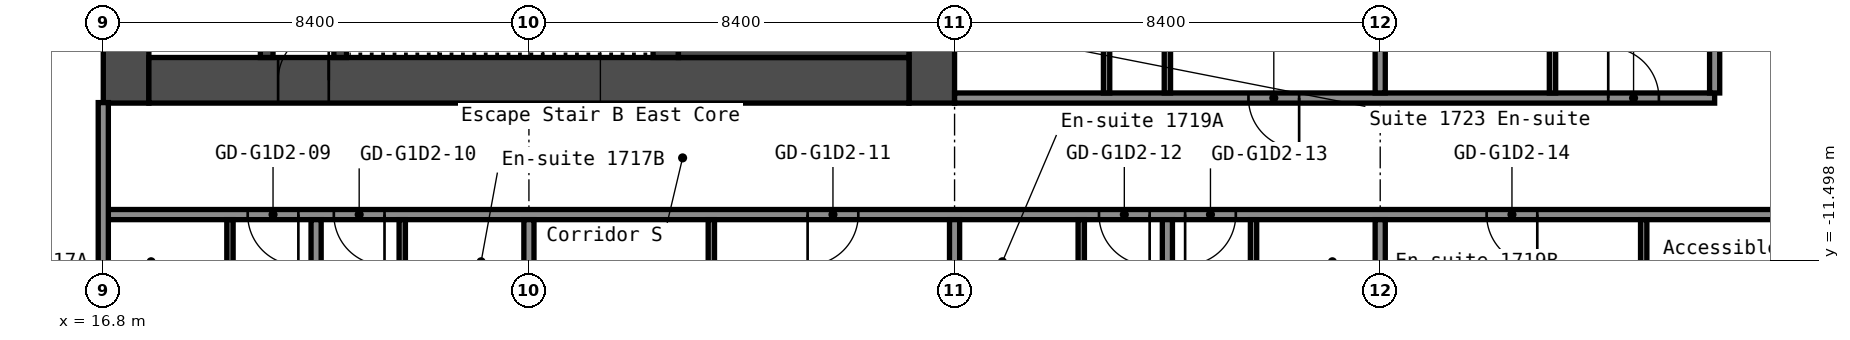
"""IFC4 building model, lengths in metres.
Left out: names, types, materials, properties, quantities, classifications, styles, units other than length and angle.
Written with IfcOpenShell. Run it as: python <this file> out.ifc"""

import sys

from ifc_helpers import new_model, si_unit, direction, frame, frame_2d, origin, place, context, subcontext, project, spatial, rectangle, extrude, element, fill, save


model = new_model("IFC4")
c1 = context("Model", 3, precision=1e-05, world=origin(), true_north=direction((0.0, 1.0)))
c2 = subcontext(c1, "Body", "Model", "MODEL_VIEW")
j1 = project(units=[si_unit("LENGTHUNIT", "METRE"), si_unit("PLANEANGLEUNIT", "RADIAN")], contexts=[c1])
p1 = place(None, origin())
s1 = spatial("IfcSite", under=j1, at=p1, CompositionType="ELEMENT")
p2 = place(p1, origin())
s2 = spatial("IfcBuilding", under=s1, at=p2, CompositionType="ELEMENT")
p3 = place(p2, frame((0.0, 0.0, 61.4)))
s3 = spatial("IfcBuildingStorey", under=s2, at=p3, CompositionType="ELEMENT", Elevation=61.4)
p4 = place(p3, frame((17.25, -8.4, 0.0), z_axis=(0.0, 0.0, 1.0), x_axis=(0.0, 1.0, 0.0)))
e1 = element("IfcWall", 1, at=p4, inside=s3, PredefinedType="SHEAR", context=c2, shape_type="SweptSolid", body=[
    extrude(rectangle(XDim=16.8, YDim=0.9, at=frame_2d((8.4, 0.0))), origin(), (0.0, 0.0, 1.0), 2.9),
])
p5 = place(p4, frame((12.75, 0.0, 0.0)))
e2 = element("IfcOpeningElement", 2, at=p5, cuts=e1, PredefinedType="OPENING", context=c2, shape_type="SweptSolid", body=[
    extrude(rectangle(XDim=1.2, YDim=2.1, at=frame_2d((0.6, 1.05))), frame((0.0, 0.46, 0.0), z_axis=(0.0, -1.0, 0.0), x_axis=(1.0, 0.0, 0.0)), (0.0, 0.0, 1.0), 0.92),
])
p6 = place(p4, frame((2.85, 0.0, 0.0)))
e3 = element("IfcOpeningElement", 3, at=p6, cuts=e1, PredefinedType="OPENING", context=c2, shape_type="SweptSolid", body=[
    extrude(rectangle(XDim=1.2, YDim=2.1, at=frame_2d((0.6, 1.05))), frame((0.0, 0.46, 0.0), z_axis=(0.0, -1.0, 0.0), x_axis=(1.0, 0.0, 0.0)), (0.0, 0.0, 1.0), 0.92),
])
p7 = place(p3, frame((33.15, -8.4, 0.0), z_axis=(0.0, 0.0, 1.0), x_axis=(0.0, 1.0, 0.0)))
e4 = element("IfcWall", 4, at=p7, inside=s3, PredefinedType="SHEAR", context=c2, shape_type="SweptSolid", body=[
    extrude(rectangle(XDim=16.8, YDim=0.9, at=frame_2d((8.4, 0.0))), origin(), (0.0, 0.0, 1.0), 2.9),
])
p8 = place(p3, frame((17.7, -7.95, 0.0), z_axis=(0.0, 0.0, 1.0), x_axis=(1.0, 0.0, 0.0)))
e5 = element("IfcWall", 5, at=p8, inside=s3, PredefinedType="SHEAR", context=c2, shape_type="SweptSolid", body=[
    extrude(rectangle(XDim=15.0, YDim=0.9, at=frame_2d((7.5, 0.0))), origin(), (0.0, 0.0, 1.0), 2.9),
])
p9 = place(p8, frame((2.55, 0.0, 0.0)))
e6 = element("IfcOpeningElement", 6, at=p9, cuts=e5, PredefinedType="OPENING", context=c2, shape_type="SweptSolid", body=[
    extrude(rectangle(XDim=1.0, YDim=2.1, at=frame_2d((0.5, 1.05))), frame((0.0, 0.46, 0.0), z_axis=(0.0, -1.0, 0.0), x_axis=(1.0, 0.0, 0.0)), (0.0, 0.0, 1.0), 0.92),
])
p10 = place(p3, frame((20.025, -7.5, 0.0), z_axis=(0.0, 0.0, 1.0), x_axis=(0.0, 1.0, 0.0)))
e7 = element("IfcWall", 7, at=p10, inside=s3, PredefinedType="SHEAR", context=c2, shape_type="SweptSolid", body=[
    extrude(rectangle(XDim=6.3, YDim=0.25, at=frame_2d((3.15, 0.0))), origin(), (0.0, 0.0, 1.0), 2.9),
])
p11 = place(p10, frame((2.4, 0.0, 0.0)))
e8 = element("IfcOpeningElement", 8, at=p11, cuts=e7, PredefinedType="OPENING", context=c2, shape_type="SweptSolid", body=[
    extrude(rectangle(XDim=1.0, YDim=2.1, at=frame_2d((0.5, 1.05))), frame((0.0, 0.135, 0.0), z_axis=(0.0, -1.0, 0.0), x_axis=(1.0, 0.0, 0.0)), (0.0, 0.0, 1.0), 0.27),
])
p12 = place(p3, frame((21.475, -7.5, 0.0), z_axis=(0.0, 0.0, 1.0), x_axis=(0.0, 1.0, 0.0)))
e9 = element("IfcWall", 9, at=p12, inside=s3, PredefinedType="SHEAR", context=c2, shape_type="SweptSolid", body=[
    extrude(rectangle(XDim=3.75, YDim=0.25, at=frame_2d((1.875, 0.0))), origin(), (0.0, 0.0, 1.0), 2.9),
])
p13 = place(p12, frame((1.3, 0.0, 0.0)))
e10 = element("IfcOpeningElement", 10, at=p13, cuts=e9, PredefinedType="OPENING", context=c2, shape_type="SweptSolid", body=[
    extrude(rectangle(XDim=1.2, YDim=2.1, at=frame_2d((0.6, 1.05))), frame((0.0, 0.135, 0.0), z_axis=(0.0, -1.0, 0.0), x_axis=(1.0, 0.0, 0.0)), (0.0, 0.0, 1.0), 0.27),
])
p14 = place(p3, frame((27.9, -7.5, 0.0), z_axis=(0.0, 0.0, 1.0), x_axis=(0.0, 1.0, 0.0)))
e11 = element("IfcWall", 11, at=p14, inside=s3, PredefinedType="SHEAR", context=c2, shape_type="SweptSolid", body=[
    extrude(rectangle(XDim=3.75, YDim=0.5, at=frame_2d((1.875, 0.0))), origin(), (0.0, 0.0, 1.0), 2.9),
])
p15 = place(p3, frame((28.15, -6.75, 0.0), z_axis=(0.0, 0.0, 1.0), x_axis=(1.0, 0.0, 0.0)))
e12 = element("IfcWall", 12, at=p15, inside=s3, PredefinedType="SHEAR", context=c2, shape_type="SweptSolid", body=[
    extrude(rectangle(XDim=4.55, YDim=1.5, at=frame_2d((2.275, 0.0))), origin(), (0.0, 0.0, 1.0), 2.9),
])
p16 = place(p3, frame((16.8, -10.6, 0.0), z_axis=(0.0, 0.0, 1.0), x_axis=(1.0, 0.0, 0.0)))
e13 = element("IfcWall", 13, at=p16, inside=s3, PredefinedType="PARTITIONING", context=c2, shape_type="SweptSolid", body=[
    extrude(rectangle(XDim=34.3, YDim=0.2, at=frame_2d((17.15, 0.0))), origin(), (0.0, 0.0, 1.0), 2.9),
])
p17 = place(p16, frame((2.85, 0.0, 0.0)))
e14 = element("IfcOpeningElement", 14, at=p17, cuts=e13, PredefinedType="OPENING", context=c2, shape_type="SweptSolid", body=[
    extrude(rectangle(XDim=1.0, YDim=2.1, at=frame_2d((0.5, 1.05))), frame((0.0, 0.11, 0.0), z_axis=(0.0, -1.0, 0.0), x_axis=(1.0, 0.0, 0.0)), (0.0, 0.0, 1.0), 0.22),
])
p18 = place(p16, frame((4.55, 0.0, 0.0)))
e15 = element("IfcOpeningElement", 15, at=p18, cuts=e13, PredefinedType="OPENING", context=c2, shape_type="SweptSolid", body=[
    extrude(rectangle(XDim=1.0, YDim=2.1, at=frame_2d((0.5, 1.05))), frame((0.0, 0.11, 0.0), z_axis=(0.0, -1.0, 0.0), x_axis=(1.0, 0.0, 0.0)), (0.0, 0.0, 1.0), 0.22),
])
p19 = place(p16, frame((13.9, 0.0, 0.0)))
e16 = element("IfcOpeningElement", 16, at=p19, cuts=e13, PredefinedType="OPENING", context=c2, shape_type="SweptSolid", body=[
    extrude(rectangle(XDim=1.0, YDim=2.1, at=frame_2d((0.5, 1.05))), frame((0.0, 0.11, 0.0), z_axis=(0.0, -1.0, 0.0), x_axis=(1.0, 0.0, 0.0)), (0.0, 0.0, 1.0), 0.22),
])
p20 = place(p16, frame((19.65, 0.0, 0.0)))
e17 = element("IfcOpeningElement", 17, at=p20, cuts=e13, PredefinedType="OPENING", context=c2, shape_type="SweptSolid", body=[
    extrude(rectangle(XDim=1.0, YDim=2.1, at=frame_2d((0.5, 1.05))), frame((0.0, 0.11, 0.0), z_axis=(0.0, -1.0, 0.0), x_axis=(1.0, 0.0, 0.0)), (0.0, 0.0, 1.0), 0.22),
])
p21 = place(p16, frame((21.35, 0.0, 0.0)))
e18 = element("IfcOpeningElement", 18, at=p21, cuts=e13, PredefinedType="OPENING", context=c2, shape_type="SweptSolid", body=[
    extrude(rectangle(XDim=1.0, YDim=2.1, at=frame_2d((0.5, 1.05))), frame((0.0, 0.11, 0.0), z_axis=(0.0, -1.0, 0.0), x_axis=(1.0, 0.0, 0.0)), (0.0, 0.0, 1.0), 0.22),
])
p22 = place(p16, frame((27.3, 0.0, 0.0)))
e19 = element("IfcOpeningElement", 19, at=p22, cuts=e13, PredefinedType="OPENING", context=c2, shape_type="SweptSolid", body=[
    extrude(rectangle(XDim=1.0, YDim=2.1, at=frame_2d((0.5, 1.05))), frame((0.0, 0.11, 0.0), z_axis=(0.0, -1.0, 0.0), x_axis=(1.0, 0.0, 0.0)), (0.0, 0.0, 1.0), 0.22),
])
p23 = place(p3, frame((33.6, -8.3, 0.0), z_axis=(0.0, 0.0, 1.0), x_axis=(1.0, 0.0, 0.0)))
e20 = element("IfcWall", 20, at=p23, inside=s3, PredefinedType="PARTITIONING", context=c2, shape_type="SweptSolid", body=[
    extrude(rectangle(XDim=15.0, YDim=0.2, at=frame_2d((7.5, 0.0))), origin(), (0.0, 0.0, 1.0), 2.9),
])
p24 = place(p23, frame((5.8, 0.0, 0.0)))
e21 = element("IfcOpeningElement", 21, at=p24, cuts=e20, PredefinedType="OPENING", context=c2, shape_type="SweptSolid", body=[
    extrude(rectangle(XDim=1.0, YDim=2.1, at=frame_2d((0.5, 1.05))), frame((0.0, 0.11, 0.0), z_axis=(0.0, -1.0, 0.0), x_axis=(1.0, 0.0, 0.0)), (0.0, 0.0, 1.0), 0.22),
])
p25 = place(p23, frame((12.9, 0.0, 0.0)))
e22 = element("IfcOpeningElement", 22, at=p25, cuts=e20, PredefinedType="OPENING", context=c2, shape_type="SweptSolid", body=[
    extrude(rectangle(XDim=1.0, YDim=2.1, at=frame_2d((0.5, 1.05))), frame((0.0, 0.11, 0.0), z_axis=(0.0, -1.0, 0.0), x_axis=(1.0, 0.0, 0.0)), (0.0, 0.0, 1.0), 0.22),
])
p26 = place(p3, frame((16.8, -20.3, 0.0), z_axis=(0.0, 0.0, 1.0), x_axis=(0.0, 1.0, 0.0)))
e23 = element("IfcWall", 23, at=p26, inside=s3, PredefinedType="PARTITIONING", context=c2, shape_type="SweptSolid", body=[
    extrude(rectangle(XDim=11.91, YDim=0.2, at=frame_2d((5.955, 0.0))), origin(), (0.0, 0.0, 1.0), 2.9),
])
p27 = place(p3, frame((19.3, -13.6, 0.0), z_axis=(0.0, 0.0, 1.0), x_axis=(0.0, 1.0, 0.0)))
e24 = element("IfcWall", 24, at=p27, inside=s3, PredefinedType="PARTITIONING", context=c2, shape_type="SweptSolid", body=[
    extrude(rectangle(XDim=2.9, YDim=0.125, at=frame_2d((1.45, 0.0))), origin(), (0.0, 0.0, 1.0), 2.9),
])
p28 = place(p27, frame((0.6, 0.0, 0.0)))
e25 = element("IfcOpeningElement", 25, at=p28, cuts=e24, PredefinedType="OPENING", context=c2, shape_type="SweptSolid", body=[
    extrude(rectangle(XDim=0.8, YDim=2.1, at=frame_2d((0.4, 1.05))), frame((0.0, 0.073, 0.0), z_axis=(0.0, -1.0, 0.0), x_axis=(1.0, 0.0, 0.0)), (0.0, 0.0, 1.0), 0.145),
])
p29 = place(p3, frame((21.0, -20.3, 0.0), z_axis=(0.0, 0.0, 1.0), x_axis=(0.0, 1.0, 0.0)))
e26 = element("IfcWall", 26, at=p29, inside=s3, PredefinedType="PARTITIONING", context=c2, shape_type="SweptSolid", body=[
    extrude(rectangle(XDim=9.6, YDim=0.2, at=frame_2d((4.8, 0.0))), origin(), (0.0, 0.0, 1.0), 2.9),
])
p30 = place(p3, frame((22.7, -13.6, 0.0), z_axis=(0.0, 0.0, 1.0), x_axis=(0.0, 1.0, 0.0)))
e27 = element("IfcWall", 27, at=p30, inside=s3, PredefinedType="PARTITIONING", context=c2, shape_type="SweptSolid", body=[
    extrude(rectangle(XDim=2.9, YDim=0.125, at=frame_2d((1.45, 0.0))), origin(), (0.0, 0.0, 1.0), 2.9),
])
p31 = place(p30, frame((0.6, 0.0, 0.0)))
e28 = element("IfcOpeningElement", 28, at=p31, cuts=e27, PredefinedType="OPENING", context=c2, shape_type="SweptSolid", body=[
    extrude(rectangle(XDim=0.8, YDim=2.1, at=frame_2d((0.4, 1.05))), frame((0.0, 0.073, 0.0), z_axis=(0.0, -1.0, 0.0), x_axis=(1.0, 0.0, 0.0)), (0.0, 0.0, 1.0), 0.145),
])
p32 = place(p3, frame((25.2, -20.3, 0.0), z_axis=(0.0, 0.0, 1.0), x_axis=(0.0, 1.0, 0.0)))
e29 = element("IfcWall", 29, at=p32, inside=s3, PredefinedType="PARTITIONING", context=c2, shape_type="SweptSolid", body=[
    extrude(rectangle(XDim=9.6, YDim=0.2, at=frame_2d((4.8, 0.0))), origin(), (0.0, 0.0, 1.0), 2.9),
])
p33 = place(p3, frame((28.8, -14.0, 0.0), z_axis=(0.0, 0.0, 1.0), x_axis=(0.0, 1.0, 0.0)))
e30 = element("IfcWall", 30, at=p33, inside=s3, PredefinedType="PARTITIONING", context=c2, shape_type="SweptSolid", body=[
    extrude(rectangle(XDim=3.3, YDim=0.125, at=frame_2d((1.65, 0.0))), origin(), (0.0, 0.0, 1.0), 2.9),
])
p34 = place(p33, frame((1.2, 0.0, 0.0)))
e31 = element("IfcOpeningElement", 31, at=p34, cuts=e30, PredefinedType="OPENING", context=c2, shape_type="SweptSolid", body=[
    extrude(rectangle(XDim=1.0, YDim=2.1, at=frame_2d((0.5, 1.05))), frame((0.0, 0.073, 0.0), z_axis=(0.0, -1.0, 0.0), x_axis=(1.0, 0.0, 0.0)), (0.0, 0.0, 1.0), 0.145),
])
p35 = place(p3, frame((33.6, -20.3, 0.0), z_axis=(0.0, 0.0, 1.0), x_axis=(0.0, 1.0, 0.0)))
e32 = element("IfcWall", 32, at=p35, inside=s3, PredefinedType="PARTITIONING", context=c2, shape_type="SweptSolid", body=[
    extrude(rectangle(XDim=9.6, YDim=0.2, at=frame_2d((4.8, 0.0))), origin(), (0.0, 0.0, 1.0), 2.9),
])
p36 = place(p3, frame((36.1, -13.6, 0.0), z_axis=(0.0, 0.0, 1.0), x_axis=(0.0, 1.0, 0.0)))
e33 = element("IfcWall", 33, at=p36, inside=s3, PredefinedType="PARTITIONING", context=c2, shape_type="SweptSolid", body=[
    extrude(rectangle(XDim=2.9, YDim=0.125, at=frame_2d((1.45, 0.0))), origin(), (0.0, 0.0, 1.0), 2.9),
])
p37 = place(p36, frame((0.6, 0.0, 0.0)))
e34 = element("IfcOpeningElement", 34, at=p37, cuts=e33, PredefinedType="OPENING", context=c2, shape_type="SweptSolid", body=[
    extrude(rectangle(XDim=0.8, YDim=2.1, at=frame_2d((0.4, 1.05))), frame((0.0, 0.073, 0.0), z_axis=(0.0, -1.0, 0.0), x_axis=(1.0, 0.0, 0.0)), (0.0, 0.0, 1.0), 0.145),
])
p38 = place(p3, frame((36.6, -8.2, 0.0), z_axis=(0.0, 0.0, 1.0), x_axis=(0.0, 1.0, 0.0)))
e35 = element("IfcWall", 35, at=p38, inside=s3, PredefinedType="PARTITIONING", context=c2, shape_type="SweptSolid", body=[
    extrude(rectangle(XDim=3.1, YDim=0.125, at=frame_2d((1.55, 0.0))), origin(), (0.0, 0.0, 1.0), 2.9),
])
p39 = place(p3, frame((37.8, -20.3, 0.0), z_axis=(0.0, 0.0, 1.0), x_axis=(0.0, 1.0, 0.0)))
e36 = element("IfcWall", 36, at=p39, inside=s3, PredefinedType="PARTITIONING", context=c2, shape_type="SweptSolid", body=[
    extrude(rectangle(XDim=9.6, YDim=0.2, at=frame_2d((4.8, 0.0))), origin(), (0.0, 0.0, 1.0), 2.9),
])
p40 = place(p3, frame((37.8, -8.2, 0.0), z_axis=(0.0, 0.0, 1.0), x_axis=(0.0, 1.0, 0.0)))
e37 = element("IfcWall", 37, at=p40, inside=s3, PredefinedType="PARTITIONING", context=c2, shape_type="SweptSolid", body=[
    extrude(rectangle(XDim=16.4, YDim=0.125, at=frame_2d((8.2, 0.0))), origin(), (0.0, 0.0, 1.0), 2.9),
])
p41 = place(p40, frame((4.05, 0.0, 0.0)))
e38 = element("IfcOpeningElement", 38, at=p41, cuts=e37, PredefinedType="OPENING", context=c2, shape_type="SweptSolid", body=[
    extrude(rectangle(XDim=0.9, YDim=2.1, at=frame_2d((0.45, 1.05))), frame((0.0, 0.073, 0.0), z_axis=(0.0, -1.0, 0.0), x_axis=(1.0, 0.0, 0.0)), (0.0, 0.0, 1.0), 0.145),
])
p42 = place(p40, frame((11.45, 0.0, 0.0)))
e39 = element("IfcOpeningElement", 39, at=p42, cuts=e37, PredefinedType="OPENING", context=c2, shape_type="SweptSolid", body=[
    extrude(rectangle(XDim=0.9, YDim=2.1, at=frame_2d((0.45, 1.05))), frame((0.0, 0.073, 0.0), z_axis=(0.0, -1.0, 0.0), x_axis=(1.0, 0.0, 0.0)), (0.0, 0.0, 1.0), 0.145),
])
p43 = place(p3, frame((39.5, -13.6, 0.0), z_axis=(0.0, 0.0, 1.0), x_axis=(0.0, 1.0, 0.0)))
e40 = element("IfcWall", 40, at=p43, inside=s3, PredefinedType="PARTITIONING", context=c2, shape_type="SweptSolid", body=[
    extrude(rectangle(XDim=2.9, YDim=0.125, at=frame_2d((1.45, 0.0))), origin(), (0.0, 0.0, 1.0), 2.9),
])
p44 = place(p43, frame((0.6, 0.0, 0.0)))
e41 = element("IfcOpeningElement", 41, at=p44, cuts=e40, PredefinedType="OPENING", context=c2, shape_type="SweptSolid", body=[
    extrude(rectangle(XDim=0.8, YDim=2.1, at=frame_2d((0.4, 1.05))), frame((0.0, 0.073, 0.0), z_axis=(0.0, -1.0, 0.0), x_axis=(1.0, 0.0, 0.0)), (0.0, 0.0, 1.0), 0.145),
])
p45 = place(p3, frame((42.0, -20.3, 0.0), z_axis=(0.0, 0.0, 1.0), x_axis=(0.0, 1.0, 0.0)))
e42 = element("IfcWall", 42, at=p45, inside=s3, PredefinedType="PARTITIONING", context=c2, shape_type="SweptSolid", body=[
    extrude(rectangle(XDim=9.6, YDim=0.2, at=frame_2d((4.8, 0.0))), origin(), (0.0, 0.0, 1.0), 2.9),
])
p46 = place(p3, frame((42.0, -8.2, 0.0), z_axis=(0.0, 0.0, 1.0), x_axis=(0.0, 1.0, 0.0)))
e43 = element("IfcWall", 43, at=p46, inside=s3, PredefinedType="PARTITIONING", context=c2, shape_type="SweptSolid", body=[
    extrude(rectangle(XDim=16.4, YDim=0.2, at=frame_2d((8.2, 0.0))), origin(), (0.0, 0.0, 1.0), 2.9),
])
p47 = place(p3, frame((45.4, -8.2, 0.0), z_axis=(0.0, 0.0, 1.0), x_axis=(0.0, 1.0, 0.0)))
e44 = element("IfcWall", 44, at=p47, inside=s3, PredefinedType="PARTITIONING", context=c2, shape_type="SweptSolid", body=[
    extrude(rectangle(XDim=3.3, YDim=0.125, at=frame_2d((1.65, 0.0))), origin(), (0.0, 0.0, 1.0), 2.9),
])
p48 = place(p3, frame((47.2, -14.0, 0.0), z_axis=(0.0, 0.0, 1.0), x_axis=(0.0, 1.0, 0.0)))
e45 = element("IfcWall", 45, at=p48, inside=s3, PredefinedType="PARTITIONING", context=c2, shape_type="SweptSolid", body=[
    extrude(rectangle(XDim=3.3, YDim=0.125, at=frame_2d((1.65, 0.0))), origin(), (0.0, 0.0, 1.0), 2.9),
])
p49 = place(p48, frame((1.2, 0.0, 0.0)))
e46 = element("IfcOpeningElement", 46, at=p49, cuts=e45, PredefinedType="OPENING", context=c2, shape_type="SweptSolid", body=[
    extrude(rectangle(XDim=1.0, YDim=2.1, at=frame_2d((0.5, 1.05))), frame((0.0, 0.073, 0.0), z_axis=(0.0, -1.0, 0.0), x_axis=(1.0, 0.0, 0.0)), (0.0, 0.0, 1.0), 0.145),
])
p50 = place(p3, frame((48.6, -8.2, 0.0), z_axis=(0.0, 0.0, 1.0), x_axis=(0.0, 1.0, 0.0)))
e47 = element("IfcWall", 47, at=p50, inside=s3, PredefinedType="PARTITIONING", context=c2, shape_type="SweptSolid", body=[
    extrude(rectangle(XDim=16.4, YDim=0.2, at=frame_2d((8.2, 0.0))), origin(), (0.0, 0.0, 1.0), 2.9),
])
p51 = place(p9, origin())
e48 = element("IfcDoor", 48, at=p51, inside=s3, OperationType="SINGLE_SWING_LEFT", PredefinedType="DOOR", context=c2, shape_type="SweptSolid", body=[
    extrude(rectangle(XDim=1.0, YDim=2.1, at=frame_2d((0.5, 1.05))), frame((0.0, 0.025, 0.0), z_axis=(0.0, -1.0, 0.0), x_axis=(1.0, 0.0, 0.0)), (0.0, 0.0, 1.0), 0.05),
])
fill(e6, e48)
p52 = place(p17, origin())
e49 = element("IfcDoor", 49, at=p52, inside=s3, OperationType="SINGLE_SWING_RIGHT", PredefinedType="DOOR", context=c2, shape_type="SweptSolid", body=[
    extrude(rectangle(XDim=1.0, YDim=2.1, at=frame_2d((0.5, 1.05))), frame((0.0, 0.025, 0.0), z_axis=(0.0, -1.0, 0.0), x_axis=(1.0, 0.0, 0.0)), (0.0, 0.0, 1.0), 0.05),
])
fill(e14, e49)
p53 = place(p18, origin())
e50 = element("IfcDoor", 50, at=p53, inside=s3, OperationType="SINGLE_SWING_RIGHT", PredefinedType="DOOR", context=c2, shape_type="SweptSolid", body=[
    extrude(rectangle(XDim=1.0, YDim=2.1, at=frame_2d((0.5, 1.05))), frame((0.0, 0.025, 0.0), z_axis=(0.0, -1.0, 0.0), x_axis=(1.0, 0.0, 0.0)), (0.0, 0.0, 1.0), 0.05),
])
fill(e15, e50)
p54 = place(p19, origin())
e51 = element("IfcDoor", 51, at=p54, inside=s3, OperationType="SINGLE_SWING_LEFT", PredefinedType="DOOR", context=c2, shape_type="SweptSolid", body=[
    extrude(rectangle(XDim=1.0, YDim=2.1, at=frame_2d((0.5, 1.05))), frame((0.0, 0.025, 0.0), z_axis=(0.0, -1.0, 0.0), x_axis=(1.0, 0.0, 0.0)), (0.0, 0.0, 1.0), 0.05),
])
fill(e16, e51)
p55 = place(p20, origin())
e52 = element("IfcDoor", 52, at=p55, inside=s3, OperationType="SINGLE_SWING_RIGHT", PredefinedType="DOOR", context=c2, shape_type="SweptSolid", body=[
    extrude(rectangle(XDim=1.0, YDim=2.1, at=frame_2d((0.5, 1.05))), frame((0.0, 0.025, 0.0), z_axis=(0.0, -1.0, 0.0), x_axis=(1.0, 0.0, 0.0)), (0.0, 0.0, 1.0), 0.05),
])
fill(e17, e52)
p56 = place(p21, origin())
e53 = element("IfcDoor", 53, at=p56, inside=s3, OperationType="SINGLE_SWING_LEFT", PredefinedType="DOOR", context=c2, shape_type="SweptSolid", body=[
    extrude(rectangle(XDim=1.0, YDim=2.1, at=frame_2d((0.5, 1.05))), frame((0.0, 0.025, 0.0), z_axis=(0.0, -1.0, 0.0), x_axis=(1.0, 0.0, 0.0)), (0.0, 0.0, 1.0), 0.05),
])
fill(e18, e53)
p57 = place(p22, origin())
e54 = element("IfcDoor", 54, at=p57, inside=s3, OperationType="SINGLE_SWING_RIGHT", PredefinedType="DOOR", context=c2, shape_type="SweptSolid", body=[
    extrude(rectangle(XDim=1.0, YDim=2.1, at=frame_2d((0.5, 1.05))), frame((0.0, 0.025, 0.0), z_axis=(0.0, -1.0, 0.0), x_axis=(1.0, 0.0, 0.0)), (0.0, 0.0, 1.0), 0.05),
])
fill(e19, e54)
p58 = place(p24, origin())
e55 = element("IfcDoor", 55, at=p58, inside=s3, OperationType="SINGLE_SWING_RIGHT", PredefinedType="DOOR", context=c2, shape_type="SweptSolid", body=[
    extrude(rectangle(XDim=1.0, YDim=2.1, at=frame_2d((0.5, 1.05))), frame((0.0, 0.025, 0.0), z_axis=(0.0, -1.0, 0.0), x_axis=(1.0, 0.0, 0.0)), (0.0, 0.0, 1.0), 0.05),
])
fill(e21, e55)
p59 = place(p25, origin())
e56 = element("IfcDoor", 56, at=p59, inside=s3, OperationType="SINGLE_SWING_RIGHT", PredefinedType="DOOR", context=c2, shape_type="SweptSolid", body=[
    extrude(rectangle(XDim=1.0, YDim=2.1, at=frame_2d((0.5, 1.05))), frame((0.0, 0.025, 0.0), z_axis=(0.0, -1.0, 0.0), x_axis=(1.0, 0.0, 0.0)), (0.0, 0.0, 1.0), 0.05),
])
fill(e22, e56)
save(model, sys.argv[1])
